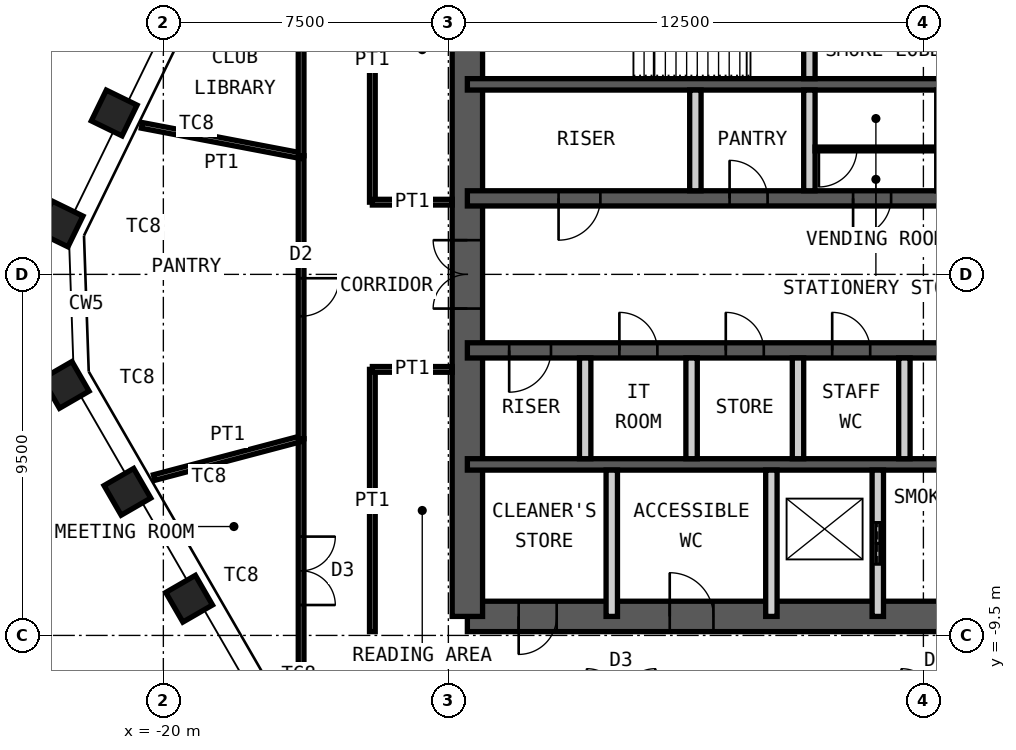
"""IFC4 building model, lengths in metres.
Left out: names, types, materials, properties, quantities, classifications, styles, units other than length and angle.
Written with IfcOpenShell. Run it as: python <this file> out.ifc"""

import sys

from ifc_helpers import new_model, si_unit, direction, frame, frame_2d, origin, origin_2d, place, context, subcontext, project, spatial, rectangle, hollow_rectangle, extrude, element, fill, save


model = new_model("IFC4")
c1 = context("Model", 3, precision=1e-05, world=origin(), true_north=direction((0.0, 1.0)))
c2 = subcontext(c1, "Body", "Model", "MODEL_VIEW")
j1 = project(units=[si_unit("LENGTHUNIT", "METRE"), si_unit("PLANEANGLEUNIT", "RADIAN")], contexts=[c1])
p1 = place(None, origin())
s1 = spatial("IfcSite", under=j1, at=p1, CompositionType="ELEMENT")
p2 = place(p1, origin())
s2 = spatial("IfcBuilding", under=s1, at=p2, CompositionType="ELEMENT")
p3 = place(p2, frame((0.0, 0.0, 320.8)))
s3 = spatial("IfcBuildingStorey", under=s2, at=p3, CompositionType="ELEMENT", Elevation=320.8)
for number, where, z_axis, x_axis in (
    (1, (-19.322, -8.534, 0.0), (0.0, 0.0, 1.0), (0.5, -0.866, 0.0)),
    (2, (-20.946, -5.721, 0.0), (0.0, 0.0, 1.0), (0.5, -0.866, 0.0)),
    (3, (-22.57, -2.908, 0.0), (0.0, 0.0, 1.0), (0.5, -0.866, 0.0)),
    (4, (-22.717, 1.327, 0.0), (0.0, 0.0, 1.0), (-0.438, -0.899, 0.0)),
    (5, (-21.293, 4.246, 0.0), (0.0, 0.0, 1.0), (-0.438, -0.899, 0.0)),
):
    element("IfcColumn", number, at=place(p3, frame(where, z_axis=z_axis, x_axis=x_axis)), inside=s3, PredefinedType="COLUMN", context=c2, shape_type="SweptSolid", body=[
        extrude(hollow_rectangle(XDim=0.9, YDim=0.9, WallThickness=0.05, at=origin_2d()), origin(), (0.0, 0.0, 1.0), 4.2),
    ])
p4 = place(p3, frame((-12.0, -9.0, 0.0), z_axis=(0.0, 0.0, 1.0), x_axis=(1.0, 0.0, 0.0)))
e6 = element("IfcWall", 6, at=p4, inside=s3, PredefinedType="SHEAR", context=c2, shape_type="SweptSolid", body=[
    extrude(rectangle(XDim=24.0, YDim=0.8, at=frame_2d((12.0, 0.0))), origin(), (0.0, 0.0, 1.0), 4.2),
])
p5 = place(p4, frame((1.35, 0.0, 0.0)))
e7 = element("IfcOpeningElement", 7, at=p5, cuts=e6, PredefinedType="OPENING", context=c2, shape_type="SweptSolid", body=[
    extrude(rectangle(XDim=1.0, YDim=2.1, at=frame_2d((0.5, 1.05))), frame((0.0, 0.41, 0.0), z_axis=(0.0, -1.0, 0.0), x_axis=(1.0, 0.0, 0.0)), (0.0, 0.0, 1.0), 0.82),
])
p6 = place(p4, frame((5.325, 0.0, 0.0)))
e8 = element("IfcOpeningElement", 8, at=p6, cuts=e6, PredefinedType="OPENING", context=c2, shape_type="SweptSolid", body=[
    extrude(rectangle(XDim=1.15, YDim=2.1, at=frame_2d((0.575, 1.05))), frame((0.0, 0.41, 0.0), z_axis=(0.0, -1.0, 0.0), x_axis=(1.0, 0.0, 0.0)), (0.0, 0.0, 1.0), 0.82),
])
p7 = place(p4, frame((12.6, 0.0, 0.0)))
e9 = element("IfcOpeningElement", 9, at=p7, cuts=e6, PredefinedType="OPENING", context=c2, shape_type="SweptSolid", body=[
    extrude(rectangle(XDim=1.0, YDim=2.1, at=frame_2d((0.5, 1.05))), frame((0.0, 0.41, 0.0), z_axis=(0.0, -1.0, 0.0), x_axis=(1.0, 0.0, 0.0)), (0.0, 0.0, 1.0), 0.82),
])
p8 = place(p3, frame((-12.0, -9.0, 0.0), z_axis=(0.0, 0.0, 1.0), x_axis=(0.0, 1.0, 0.0)))
e10 = element("IfcWall", 10, at=p8, inside=s3, PredefinedType="SHEAR", context=c2, shape_type="SweptSolid", body=[
    extrude(rectangle(XDim=18.0, YDim=0.8, at=frame_2d((9.0, 0.0))), origin(), (0.0, 0.0, 1.0), 4.2),
])
p9 = place(p8, frame((8.1, 0.0, 0.0)))
e11 = element("IfcOpeningElement", 11, at=p9, cuts=e10, PredefinedType="OPENING", context=c2, shape_type="SweptSolid", body=[
    extrude(rectangle(XDim=1.8, YDim=2.1, at=frame_2d((0.9, 1.05))), frame((0.0, 0.41, 0.0), z_axis=(0.0, -1.0, 0.0), x_axis=(1.0, 0.0, 0.0)), (0.0, 0.0, 1.0), 0.82),
])
p10 = place(p3, frame((-12.0, 5.0, 0.0), z_axis=(0.0, 0.0, 1.0), x_axis=(1.0, 0.0, 0.0)))
e12 = element("IfcWall", 12, at=p10, inside=s3, PredefinedType="SHEAR", context=c2, shape_type="SweptSolid", body=[
    extrude(rectangle(XDim=24.0, YDim=0.3, at=frame_2d((12.0, 0.0))), origin(), (0.0, 0.0, 1.0), 4.2),
])
p11 = place(p3, frame((-12.0, 2.0, 0.0), z_axis=(0.0, 0.0, 1.0), x_axis=(1.0, 0.0, 0.0)))
e13 = element("IfcWall", 13, at=p11, inside=s3, PredefinedType="SHEAR", context=c2, shape_type="SweptSolid", body=[
    extrude(rectangle(XDim=24.0, YDim=0.4, at=frame_2d((12.0, 0.0))), origin(), (0.0, 0.0, 1.0), 4.2),
])
p12 = place(p11, frame((2.4, 0.0, 0.0)))
e14 = element("IfcOpeningElement", 14, at=p12, cuts=e13, PredefinedType="OPENING", context=c2, shape_type="SweptSolid", body=[
    extrude(rectangle(XDim=1.1, YDim=2.1, at=frame_2d((0.55, 1.05))), frame((0.0, 0.21, 0.0), z_axis=(0.0, -1.0, 0.0), x_axis=(1.0, 0.0, 0.0)), (0.0, 0.0, 1.0), 0.42),
])
p13 = place(p11, frame((22.0, 0.0, 0.0)))
e15 = element("IfcOpeningElement", 15, at=p13, cuts=e13, PredefinedType="OPENING", context=c2, shape_type="SweptSolid", body=[
    extrude(rectangle(XDim=1.1, YDim=2.1, at=frame_2d((0.55, 1.05))), frame((0.0, 0.21, 0.0), z_axis=(0.0, -1.0, 0.0), x_axis=(1.0, 0.0, 0.0)), (0.0, 0.0, 1.0), 0.42),
])
p14 = place(p11, frame((10.15, 0.0, 0.0)))
e16 = element("IfcOpeningElement", 16, at=p14, cuts=e13, PredefinedType="OPENING", context=c2, shape_type="SweptSolid", body=[
    extrude(rectangle(XDim=1.0, YDim=2.1, at=frame_2d((0.5, 1.05))), frame((0.0, 0.21, 0.0), z_axis=(0.0, -1.0, 0.0), x_axis=(1.0, 0.0, 0.0)), (0.0, 0.0, 1.0), 0.42),
])
p15 = place(p11, frame((6.9, 0.0, 0.0)))
e17 = element("IfcOpeningElement", 17, at=p15, cuts=e13, PredefinedType="OPENING", context=c2, shape_type="SweptSolid", body=[
    extrude(rectangle(XDim=1.0, YDim=2.1, at=frame_2d((0.5, 1.05))), frame((0.0, 0.21, 0.0), z_axis=(0.0, -1.0, 0.0), x_axis=(1.0, 0.0, 0.0)), (0.0, 0.0, 1.0), 0.42),
])
p16 = place(p11, frame((13.35, 0.0, 0.0)))
e18 = element("IfcOpeningElement", 18, at=p16, cuts=e13, PredefinedType="OPENING", context=c2, shape_type="SweptSolid", body=[
    extrude(rectangle(XDim=1.1, YDim=2.4, at=frame_2d((0.55, 1.2))), frame((0.0, 0.21, 0.0), z_axis=(0.0, -1.0, 0.0), x_axis=(1.0, 0.0, 0.0)), (0.0, 0.0, 1.0), 0.42),
])
p17 = place(p11, frame((16.15, 0.0, 0.0)))
e19 = element("IfcOpeningElement", 19, at=p17, cuts=e13, PredefinedType="OPENING", context=c2, shape_type="SweptSolid", body=[
    extrude(rectangle(XDim=1.1, YDim=2.4, at=frame_2d((0.55, 1.2))), frame((0.0, 0.21, 0.0), z_axis=(0.0, -1.0, 0.0), x_axis=(1.0, 0.0, 0.0)), (0.0, 0.0, 1.0), 0.42),
])
p18 = place(p11, frame((19.0, 0.0, 0.0)))
e20 = element("IfcOpeningElement", 20, at=p18, cuts=e13, PredefinedType="OPENING", context=c2, shape_type="SweptSolid", body=[
    extrude(rectangle(XDim=1.0, YDim=2.1, at=frame_2d((0.5, 1.05))), frame((0.0, 0.21, 0.0), z_axis=(0.0, -1.0, 0.0), x_axis=(1.0, 0.0, 0.0)), (0.0, 0.0, 1.0), 0.42),
])
p19 = place(p3, frame((-12.0, -2.0, 0.0), z_axis=(0.0, 0.0, 1.0), x_axis=(1.0, 0.0, 0.0)))
e21 = element("IfcWall", 21, at=p19, inside=s3, PredefinedType="SHEAR", context=c2, shape_type="SweptSolid", body=[
    extrude(rectangle(XDim=24.0, YDim=0.4, at=frame_2d((12.0, 0.0))), origin(), (0.0, 0.0, 1.0), 4.2),
])
p20 = place(p19, frame((1.1, 0.0, 0.0)))
e22 = element("IfcOpeningElement", 22, at=p20, cuts=e21, PredefinedType="OPENING", context=c2, shape_type="SweptSolid", body=[
    extrude(rectangle(XDim=1.1, YDim=2.1, at=frame_2d((0.55, 1.05))), frame((0.0, 0.21, 0.0), z_axis=(0.0, -1.0, 0.0), x_axis=(1.0, 0.0, 0.0)), (0.0, 0.0, 1.0), 0.42),
])
p21 = place(p19, frame((13.55, 0.0, 0.0)))
e23 = element("IfcOpeningElement", 23, at=p21, cuts=e21, PredefinedType="OPENING", context=c2, shape_type="SweptSolid", body=[
    extrude(rectangle(XDim=1.1, YDim=2.1, at=frame_2d((0.55, 1.05))), frame((0.0, 0.21, 0.0), z_axis=(0.0, -1.0, 0.0), x_axis=(1.0, 0.0, 0.0)), (0.0, 0.0, 1.0), 0.42),
])
p22 = place(p19, frame((20.7, 0.0, 0.0)))
e24 = element("IfcOpeningElement", 24, at=p22, cuts=e21, PredefinedType="OPENING", context=c2, shape_type="SweptSolid", body=[
    extrude(rectangle(XDim=1.1, YDim=2.1, at=frame_2d((0.55, 1.05))), frame((0.0, 0.21, 0.0), z_axis=(0.0, -1.0, 0.0), x_axis=(1.0, 0.0, 0.0)), (0.0, 0.0, 1.0), 0.42),
])
p23 = place(p19, frame((4.0, 0.0, 0.0)))
e25 = element("IfcOpeningElement", 25, at=p23, cuts=e21, PredefinedType="OPENING", context=c2, shape_type="SweptSolid", body=[
    extrude(rectangle(XDim=1.0, YDim=2.1, at=frame_2d((0.5, 1.05))), frame((0.0, 0.21, 0.0), z_axis=(0.0, -1.0, 0.0), x_axis=(1.0, 0.0, 0.0)), (0.0, 0.0, 1.0), 0.42),
])
p24 = place(p19, frame((6.8, 0.0, 0.0)))
e26 = element("IfcOpeningElement", 26, at=p24, cuts=e21, PredefinedType="OPENING", context=c2, shape_type="SweptSolid", body=[
    extrude(rectangle(XDim=1.0, YDim=2.1, at=frame_2d((0.5, 1.05))), frame((0.0, 0.21, 0.0), z_axis=(0.0, -1.0, 0.0), x_axis=(1.0, 0.0, 0.0)), (0.0, 0.0, 1.0), 0.42),
])
p25 = place(p19, frame((9.6, 0.0, 0.0)))
e27 = element("IfcOpeningElement", 27, at=p25, cuts=e21, PredefinedType="OPENING", context=c2, shape_type="SweptSolid", body=[
    extrude(rectangle(XDim=1.0, YDim=2.1, at=frame_2d((0.5, 1.05))), frame((0.0, 0.21, 0.0), z_axis=(0.0, -1.0, 0.0), x_axis=(1.0, 0.0, 0.0)), (0.0, 0.0, 1.0), 0.42),
])
p26 = place(p3, frame((-12.0, -5.0, 0.0), z_axis=(0.0, 0.0, 1.0), x_axis=(1.0, 0.0, 0.0)))
e28 = element("IfcWall", 28, at=p26, inside=s3, PredefinedType="SHEAR", context=c2, shape_type="SweptSolid", body=[
    extrude(rectangle(XDim=24.0, YDim=0.3, at=frame_2d((12.0, 0.0))), origin(), (0.0, 0.0, 1.0), 4.2),
])
p27 = place(p3, frame((-3.0, 5.15, 0.0), z_axis=(0.0, 0.0, 1.0), x_axis=(0.0, 1.0, 0.0)))
e29 = element("IfcWall", 29, at=p27, inside=s3, PredefinedType="PARTITIONING", context=c2, shape_type="SweptSolid", body=[
    extrude(rectangle(XDim=3.85, YDim=0.3, at=frame_2d((1.925, 0.0))), origin(), (0.0, 0.0, 1.0), 3.98),
])
p28 = place(p27, frame((1.425, 0.0, 0.0)))
e30 = element("IfcOpeningElement", 30, at=p28, cuts=e29, PredefinedType="OPENING", context=c2, shape_type="SweptSolid", body=[
    extrude(rectangle(XDim=1.0, YDim=2.1, at=frame_2d((0.5, 1.05))), frame((0.0, 0.16, 0.0), z_axis=(0.0, -1.0, 0.0), x_axis=(1.0, 0.0, 0.0)), (0.0, 0.0, 1.0), 0.32),
])
for number, where, z_axis, x_axis in (
    (31, (-6.0, 2.2, 0.0), (0.0, 0.0, 1.0), (0.0, 1.0, 0.0)),
    (32, (-3.0, 2.2, 0.0), (0.0, 0.0, 1.0), (0.0, 1.0, 0.0)),
    (33, (0.5, 2.2, 0.0), (0.0, 0.0, 1.0), (0.0, 1.0, 0.0)),
    (34, (-8.9, -4.85, 0.0), (0.0, 0.0, 1.0), (0.0, 1.0, 0.0)),
    (35, (-6.1, -4.85, 0.0), (0.0, 0.0, 1.0), (0.0, 1.0, 0.0)),
    (36, (-3.3, -4.85, 0.0), (0.0, 0.0, 1.0), (0.0, 1.0, 0.0)),
    (37, (-0.5, -4.85, 0.0), (0.0, 0.0, 1.0), (0.0, 1.0, 0.0)),
):
    element("IfcWall", number, at=place(p3, frame(where, z_axis=z_axis, x_axis=x_axis)), inside=s3, PredefinedType="PARTITIONING", context=c2, shape_type="SweptSolid", body=[
        extrude(rectangle(XDim=2.65, YDim=0.3, at=frame_2d((1.325, 0.0))), origin(), (0.0, 0.0, 1.0), 3.98),
    ])
for number, where, z_axis, x_axis in (
    (38, (-8.2, -9.0, 0.0), (0.0, 0.0, 1.0), (0.0, 1.0, 0.0)),
    (39, (-4.0, -9.0, 0.0), (0.0, 0.0, 1.0), (0.0, 1.0, 0.0)),
):
    element("IfcWall", number, at=place(p3, frame(where, z_axis=z_axis, x_axis=x_axis)), inside=s3, PredefinedType="PARTITIONING", context=c2, shape_type="SweptSolid", body=[
        extrude(rectangle(XDim=3.85, YDim=0.3, at=frame_2d((1.925, 0.0))), origin(), (0.0, 0.0, 1.0), 3.98),
    ])
p29 = place(p3, frame((-1.2, -9.0, 0.0), z_axis=(0.0, 0.0, 1.0), x_axis=(0.0, 1.0, 0.0)))
e40 = element("IfcWall", 40, at=p29, inside=s3, PredefinedType="PARTITIONING", context=c2, shape_type="SweptSolid", body=[
    extrude(rectangle(XDim=3.85, YDim=0.3, at=frame_2d((1.925, 0.0))), origin(), (0.0, 0.0, 1.0), 3.98),
])
p30 = place(p29, frame((1.375, 0.0, 0.0)))
e41 = element("IfcOpeningElement", 41, at=p30, cuts=e40, PredefinedType="OPENING", context=c2, shape_type="SweptSolid", body=[
    extrude(rectangle(XDim=1.1, YDim=2.4, at=frame_2d((0.55, 1.2))), frame((0.0, 0.16, 0.0), z_axis=(0.0, -1.0, 0.0), x_axis=(1.0, 0.0, 0.0)), (0.0, 0.0, 1.0), 0.32),
])
p31 = place(p3, frame((-2.85, 3.3, 0.0), z_axis=(0.0, 0.0, 1.0), x_axis=(1.0, 0.0, 0.0)))
e42 = element("IfcWall", 42, at=p31, inside=s3, PredefinedType="PARTITIONING", context=c2, shape_type="SweptSolid", body=[
    extrude(rectangle(XDim=3.2, YDim=0.1, at=frame_2d((1.6, 0.0))), origin(), (0.0, 0.0, 1.0), 3.98),
])
p32 = place(p31, frame((0.1, 0.0, 0.0)))
e43 = element("IfcOpeningElement", 43, at=p32, cuts=e42, PredefinedType="OPENING", context=c2, shape_type="SweptSolid", body=[
    extrude(rectangle(XDim=1.0, YDim=2.4, at=frame_2d((0.5, 1.2))), frame((0.0, 0.06, 0.0), z_axis=(0.0, -1.0, 0.0), x_axis=(1.0, 0.0, 0.0)), (0.0, 0.0, 1.0), 0.12),
])
p33 = place(p3, frame((-16.375, -11.275, 0.0), z_axis=(0.0, 0.0, 1.0), x_axis=(0.0, 1.0, 0.0)))
e44 = element("IfcWall", 44, at=p33, inside=s3, PredefinedType="PARTITIONING", context=c2, shape_type="SweptSolid", body=[
    extrude(rectangle(XDim=6.95, YDim=0.15, at=frame_2d((3.475, 0.0))), origin(), (0.0, 0.0, 1.0), 4.03),
])
p34 = place(p33, frame((2.575, 0.0, 0.0)))
e45 = element("IfcOpeningElement", 45, at=p34, cuts=e44, PredefinedType="OPENING", context=c2, shape_type="SweptSolid", body=[
    extrude(rectangle(XDim=1.8, YDim=2.4, at=frame_2d((0.9, 1.2))), frame((0.0, 0.085, 0.0), z_axis=(0.0, -1.0, 0.0), x_axis=(1.0, 0.0, 0.0)), (0.0, 0.0, 1.0), 0.17),
])
p35 = place(p3, frame((-20.243, -5.346, 0.0), z_axis=(0.0, 0.0, 1.0), x_axis=(0.966848057487, 0.255352371703, 0.0)))
e46 = element("IfcWall", 46, at=p35, inside=s3, PredefinedType="PARTITIONING", context=c2, shape_type="SweptSolid", body=[
    extrude(rectangle(XDim=4.0, YDim=0.15, at=frame_2d((2.0, 0.0))), origin(), (0.0, 0.0, 1.0), 3.33),
])
p36 = place(p3, frame((-16.375, -4.324, 0.0), z_axis=(0.0, 0.0, 1.0), x_axis=(0.0, 1.0, 0.0)))
e47 = element("IfcWall", 47, at=p36, inside=s3, PredefinedType="PARTITIONING", context=c2, shape_type="SweptSolid", body=[
    extrude(rectangle(XDim=7.446, YDim=0.15, at=frame_2d((3.723, 0.0))), origin(), (0.0, 0.0, 1.0), 4.03),
])
p37 = place(p36, frame((3.223, 0.0, 0.0)))
e48 = element("IfcOpeningElement", 48, at=p37, cuts=e47, PredefinedType="OPENING", context=c2, shape_type="SweptSolid", body=[
    extrude(rectangle(XDim=1.0, YDim=2.4, at=frame_2d((0.5, 1.2))), frame((0.0, 0.085, 0.0), z_axis=(0.0, -1.0, 0.0), x_axis=(1.0, 0.0, 0.0)), (0.0, 0.0, 1.0), 0.17),
])
p38 = place(p3, frame((-20.566, 3.921, 0.0), z_axis=(0.0, 0.0, 1.0), x_axis=(0.982305997167, -0.187283015595, 0.0)))
e49 = element("IfcWall", 49, at=p38, inside=s3, PredefinedType="PARTITIONING", context=c2, shape_type="SweptSolid", body=[
    extrude(rectangle(XDim=4.267, YDim=0.15, at=frame_2d((2.133, 0.0))), origin(), (0.0, 0.0, 1.0), 3.33),
])
p39 = place(p3, frame((-16.375, 3.122, 0.0), z_axis=(0.0, 0.0, 1.0), x_axis=(0.0, 1.0, 0.0)))
e50 = element("IfcWall", 50, at=p39, inside=s3, PredefinedType="PARTITIONING", context=c2, shape_type="SweptSolid", body=[
    extrude(rectangle(XDim=8.153, YDim=0.15, at=frame_2d((4.077, 0.0))), origin(), (0.0, 0.0, 1.0), 4.03),
])
p40 = place(p39, frame((3.177, 0.0, 0.0)))
e51 = element("IfcOpeningElement", 51, at=p40, cuts=e50, PredefinedType="OPENING", context=c2, shape_type="SweptSolid", body=[
    extrude(rectangle(XDim=1.8, YDim=2.4, at=frame_2d((0.9, 1.2))), frame((0.0, 0.085, 0.0), z_axis=(0.0, -1.0, 0.0), x_axis=(1.0, 0.0, 0.0)), (0.0, 0.0, 1.0), 0.17),
])
p41 = place(p3, frame((-14.5, 1.9, 0.0), z_axis=(0.0, 0.0, 1.0), x_axis=(0.0, 1.0, 0.0)))
e52 = element("IfcWall", 52, at=p41, inside=s3, PredefinedType="PARTITIONING", context=c2, shape_type="SweptSolid", body=[
    extrude(rectangle(XDim=7.5, YDim=0.15, at=frame_2d((3.75, 0.0))), origin(), (0.0, 0.0, 1.0), 4.03),
])
p42 = place(p3, frame((-12.4, 1.9, 0.0), z_axis=(0.0, 0.0, 1.0), x_axis=(-1.0, 0.0, 0.0)))
e53 = element("IfcWall", 53, at=p42, inside=s3, PredefinedType="PARTITIONING", context=c2, shape_type="SweptSolid", body=[
    extrude(rectangle(XDim=2.1, YDim=0.15, at=frame_2d((1.05, 0.0))), origin(), (0.0, 0.0, 1.0), 3.53),
])
p43 = place(p3, frame((-14.5, -9.4, 0.0), z_axis=(0.0, 0.0, 1.0), x_axis=(0.0, 1.0, 0.0)))
e54 = element("IfcWall", 54, at=p43, inside=s3, PredefinedType="PARTITIONING", context=c2, shape_type="SweptSolid", body=[
    extrude(rectangle(XDim=6.9, YDim=0.15, at=frame_2d((3.45, 0.0))), origin(), (0.0, 0.0, 1.0), 4.03),
])
p44 = place(p3, frame((-12.4, -2.5, 0.0), z_axis=(0.0, 0.0, 1.0), x_axis=(-1.0, 0.0, 0.0)))
e55 = element("IfcWall", 55, at=p44, inside=s3, PredefinedType="PARTITIONING", context=c2, shape_type="SweptSolid", body=[
    extrude(rectangle(XDim=2.1, YDim=0.15, at=frame_2d((1.05, 0.0))), origin(), (0.0, 0.0, 1.0), 3.53),
])
p45 = place(p5, origin())
e56 = element("IfcDoor", 56, at=p45, inside=s3, OperationType="SINGLE_SWING_LEFT", PredefinedType="DOOR", context=c2, shape_type="SweptSolid", body=[
    extrude(rectangle(XDim=1.0, YDim=2.1, at=frame_2d((0.5, 1.05))), frame((0.0, 0.025, 0.0), z_axis=(0.0, -1.0, 0.0), x_axis=(1.0, 0.0, 0.0)), (0.0, 0.0, 1.0), 0.05),
])
fill(e7, e56)
p46 = place(p6, origin())
e57 = element("IfcDoor", 57, at=p46, inside=s3, OperationType="SINGLE_SWING_RIGHT", PredefinedType="DOOR", context=c2, shape_type="SweptSolid", body=[
    extrude(rectangle(XDim=1.15, YDim=2.1, at=frame_2d((0.575, 1.05))), frame((0.0, 0.025, 0.0), z_axis=(0.0, -1.0, 0.0), x_axis=(1.0, 0.0, 0.0)), (0.0, 0.0, 1.0), 0.05),
])
fill(e8, e57)
p47 = place(p12, origin())
e58 = element("IfcDoor", 58, at=p47, inside=s3, OperationType="SINGLE_SWING_LEFT", PredefinedType="DOOR", context=c2, shape_type="SweptSolid", body=[
    extrude(rectangle(XDim=1.1, YDim=2.1, at=frame_2d((0.55, 1.05))), frame((0.0, 0.025, 0.0), z_axis=(0.0, -1.0, 0.0), x_axis=(1.0, 0.0, 0.0)), (0.0, 0.0, 1.0), 0.05),
])
fill(e14, e58)
p48 = place(p20, origin())
e59 = element("IfcDoor", 59, at=p48, inside=s3, OperationType="SINGLE_SWING_LEFT", PredefinedType="DOOR", context=c2, shape_type="SweptSolid", body=[
    extrude(rectangle(XDim=1.1, YDim=2.1, at=frame_2d((0.55, 1.05))), frame((0.0, 0.025, 0.0), z_axis=(0.0, -1.0, 0.0), x_axis=(1.0, 0.0, 0.0)), (0.0, 0.0, 1.0), 0.05),
])
fill(e22, e59)
p49 = place(p14, origin())
e60 = element("IfcDoor", 60, at=p49, inside=s3, OperationType="SINGLE_SWING_LEFT", PredefinedType="DOOR", context=c2, shape_type="SweptSolid", body=[
    extrude(rectangle(XDim=1.0, YDim=2.1, at=frame_2d((0.5, 1.05))), frame((0.0, 0.025, 0.0), z_axis=(0.0, -1.0, 0.0), x_axis=(1.0, 0.0, 0.0)), (0.0, 0.0, 1.0), 0.05),
])
fill(e16, e60)
p50 = place(p9, origin())
e61 = element("IfcDoor", 61, at=p50, inside=s3, OperationType="DOUBLE_DOOR_DOUBLE_SWING", PredefinedType="DOOR", context=c2, shape_type="SweptSolid", body=[
    extrude(rectangle(XDim=1.8, YDim=2.1, at=frame_2d((0.9, 1.05))), frame((0.0, 0.025, 0.0), z_axis=(0.0, -1.0, 0.0), x_axis=(1.0, 0.0, 0.0)), (0.0, 0.0, 1.0), 0.05),
])
fill(e11, e61)
p51 = place(p30, origin())
e62 = element("IfcDoor", 62, at=p51, inside=s3, OperationType="DOUBLE_DOOR_SLIDING", PredefinedType="DOOR", context=c2, shape_type="SweptSolid", body=[
    extrude(rectangle(XDim=1.1, YDim=2.4, at=frame_2d((0.55, 1.2))), frame((0.0, 0.025, 0.0), z_axis=(0.0, -1.0, 0.0), x_axis=(1.0, 0.0, 0.0)), (0.0, 0.0, 1.0), 0.05),
])
fill(e41, e62)
p52 = place(p15, origin())
e63 = element("IfcDoor", 63, at=p52, inside=s3, OperationType="SINGLE_SWING_RIGHT", PredefinedType="DOOR", context=c2, shape_type="SweptSolid", body=[
    extrude(rectangle(XDim=1.0, YDim=2.1, at=frame_2d((0.5, 1.05))), frame((0.0, 0.025, 0.0), z_axis=(0.0, -1.0, 0.0), x_axis=(1.0, 0.0, 0.0)), (0.0, 0.0, 1.0), 0.05),
])
fill(e17, e63)
p53 = place(p23, origin())
e64 = element("IfcDoor", 64, at=p53, inside=s3, OperationType="SINGLE_SWING_RIGHT", PredefinedType="DOOR", context=c2, shape_type="SweptSolid", body=[
    extrude(rectangle(XDim=1.0, YDim=2.1, at=frame_2d((0.5, 1.05))), frame((0.0, 0.025, 0.0), z_axis=(0.0, -1.0, 0.0), x_axis=(1.0, 0.0, 0.0)), (0.0, 0.0, 1.0), 0.05),
])
fill(e25, e64)
p54 = place(p24, origin())
e65 = element("IfcDoor", 65, at=p54, inside=s3, OperationType="SINGLE_SWING_RIGHT", PredefinedType="DOOR", context=c2, shape_type="SweptSolid", body=[
    extrude(rectangle(XDim=1.0, YDim=2.1, at=frame_2d((0.5, 1.05))), frame((0.0, 0.025, 0.0), z_axis=(0.0, -1.0, 0.0), x_axis=(1.0, 0.0, 0.0)), (0.0, 0.0, 1.0), 0.05),
])
fill(e26, e65)
p55 = place(p25, origin())
e66 = element("IfcDoor", 66, at=p55, inside=s3, OperationType="SINGLE_SWING_RIGHT", PredefinedType="DOOR", context=c2, shape_type="SweptSolid", body=[
    extrude(rectangle(XDim=1.0, YDim=2.1, at=frame_2d((0.5, 1.05))), frame((0.0, 0.025, 0.0), z_axis=(0.0, -1.0, 0.0), x_axis=(1.0, 0.0, 0.0)), (0.0, 0.0, 1.0), 0.05),
])
fill(e27, e66)
p56 = place(p32, origin())
e67 = element("IfcDoor", 67, at=p56, inside=s3, OperationType="SINGLE_SWING_LEFT", PredefinedType="DOOR", context=c2, shape_type="SweptSolid", body=[
    extrude(rectangle(XDim=1.0, YDim=2.4, at=frame_2d((0.5, 1.2))), frame((0.0, 0.025, 0.0), z_axis=(0.0, -1.0, 0.0), x_axis=(1.0, 0.0, 0.0)), (0.0, 0.0, 1.0), 0.05),
])
fill(e43, e67)
p57 = place(p34, origin())
e68 = element("IfcDoor", 68, at=p57, inside=s3, OperationType="DOUBLE_DOOR_DOUBLE_SWING", PredefinedType="DOOR", context=c2, shape_type="SweptSolid", body=[
    extrude(rectangle(XDim=1.8, YDim=2.4, at=frame_2d((0.9, 1.2))), frame((0.0, 0.025, 0.0), z_axis=(0.0, -1.0, 0.0), x_axis=(1.0, 0.0, 0.0)), (0.0, 0.0, 1.0), 0.05),
])
fill(e45, e68)
p58 = place(p37, origin())
e69 = element("IfcDoor", 69, at=p58, inside=s3, OperationType="SINGLE_SWING_RIGHT", PredefinedType="DOOR", context=c2, shape_type="SweptSolid", body=[
    extrude(rectangle(XDim=1.0, YDim=2.4, at=frame_2d((0.5, 1.2))), frame((0.0, 0.025, 0.0), z_axis=(0.0, -1.0, 0.0), x_axis=(1.0, 0.0, 0.0)), (0.0, 0.0, 1.0), 0.05),
])
fill(e48, e69)
save(model, sys.argv[1])
